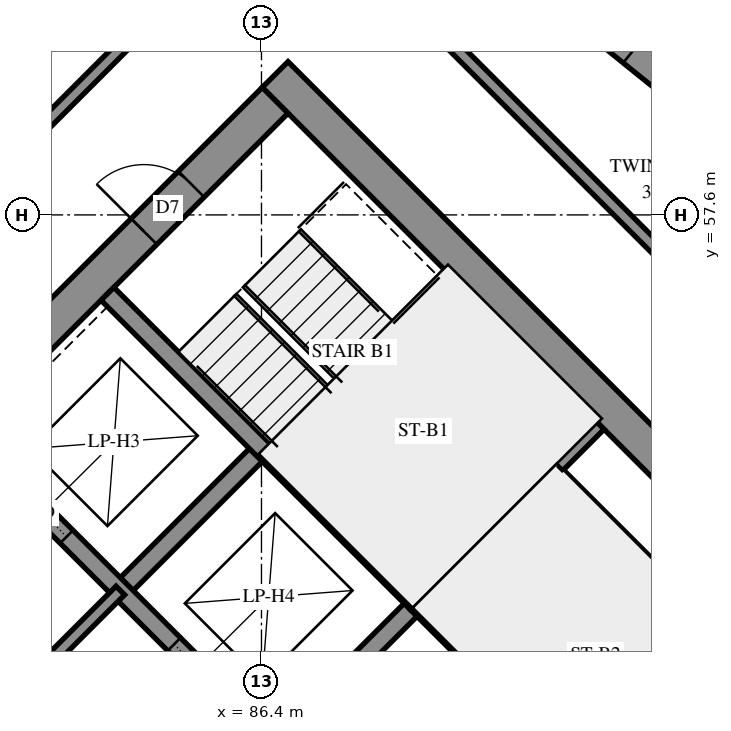
"""IFC4 building model, lengths in metres.
Left out: names, types, materials, properties, quantities, classifications, styles, units other than length and angle.
Written with IfcOpenShell. Run it as: python <this file> out.ifc"""

import sys

from ifc_helpers import new_model, si_unit, direction, frame, frame_2d, origin, place, context, subcontext, project, spatial, polyline, rectangle, outline, extrude, element, fill, save


model = new_model("IFC4")
c1 = context("Model", 3, precision=1e-05, world=origin(), true_north=direction((0.0, 1.0)))
c2 = subcontext(c1, "Body", "Model", "MODEL_VIEW")
j1 = project(units=[si_unit("LENGTHUNIT", "METRE"), si_unit("PLANEANGLEUNIT", "RADIAN")], contexts=[c1])
p1 = place(None, origin())
s1 = spatial("IfcSite", under=j1, at=p1, CompositionType="ELEMENT")
p2 = place(p1, origin())
s2 = spatial("IfcBuilding", under=s1, at=p2, CompositionType="ELEMENT")
p3 = place(p2, frame((0.0, 0.0, 142.2)))
s3 = spatial("IfcBuildingStorey", under=s2, at=p3, CompositionType="ELEMENT", Elevation=142.2)
p4 = place(p3, frame((86.625, 59.908, -0.3), z_axis=(0.0, 0.0, 1.0), x_axis=(0.7071067812, -0.7071067812, 0.0)))
e1 = element("IfcWall", 1, at=p4, inside=s3, PredefinedType="SHEAR", context=c2, shape_type="SweptSolid", body=[
    extrude(rectangle(XDim=15.6, YDim=0.6, at=frame_2d((7.8, 0.0))), origin(), (0.0, 0.0, 1.0), 2.7),
])
p5 = place(p4, frame((10.6, 0.0, 0.3)))
e2 = element("IfcOpeningElement", 2, at=p5, cuts=e1, PredefinedType="OPENING", context=c2, shape_type="SweptSolid", body=[
    extrude(rectangle(XDim=0.8, YDim=2.1, at=frame_2d((0.4, 1.05))), frame((0.0, 0.31, 0.0), z_axis=(0.0, -1.0, 0.0), x_axis=(1.0, 0.0, 0.0)), (0.0, 0.0, 1.0), 0.62),
])
p6 = place(p3, frame((76.442, 49.302, -0.3), z_axis=(0.0, 0.0, 1.0), x_axis=(0.7071067812, 0.7071067812, 0.0)))
e3 = element("IfcWall", 3, at=p6, inside=s3, PredefinedType="SHEAR", context=c2, shape_type="SweptSolid", body=[
    extrude(rectangle(XDim=14.4, YDim=0.6, at=frame_2d((7.2, 0.0))), origin(), (0.0, 0.0, 1.0), 2.7),
])
p7 = place(p6, frame((4.55, 0.0, 0.3)))
e4 = element("IfcOpeningElement", 4, at=p7, cuts=e3, PredefinedType="OPENING", context=c2, shape_type="SweptSolid", body=[
    extrude(rectangle(XDim=1.1, YDim=2.1, at=frame_2d((0.55, 1.05))), frame((0.0, 0.31, 0.0), z_axis=(0.0, -1.0, 0.0), x_axis=(1.0, 0.0, 0.0)), (0.0, 0.0, 1.0), 0.62),
])
p8 = place(p6, frame((11.35, 0.0, 0.3)))
e5 = element("IfcOpeningElement", 5, at=p8, cuts=e3, PredefinedType="OPENING", context=c2, shape_type="SweptSolid", body=[
    extrude(rectangle(XDim=1.1, YDim=2.1, at=frame_2d((0.55, 1.05))), frame((0.0, 0.31, 0.0), z_axis=(0.0, -1.0, 0.0), x_axis=(1.0, 0.0, 0.0)), (0.0, 0.0, 1.0), 0.62),
])
p9 = place(p3, frame((84.079, 51.423, 0.0), z_axis=(0.0, 0.0, 1.0), x_axis=(0.7071219326, 0.7070916295, 0.0)))
e6 = element("IfcWall", 6, at=p9, inside=s3, PredefinedType="SOLIDWALL", context=c2, shape_type="SweptSolid", body=[
    extrude(rectangle(XDim=3.3, YDim=0.3, at=frame_2d((1.65, 0.0))), origin(), (0.0, 0.0, 1.0), 3.1),
])
p10 = place(p3, frame((86.625, 48.878, 0.0), z_axis=(0.0, 0.0, 1.0), x_axis=(0.7071067812, 0.7071067812, 0.0)))
e7 = element("IfcWall", 7, at=p10, inside=s3, PredefinedType="SOLIDWALL", context=c2, shape_type="SweptSolid", body=[
    extrude(rectangle(XDim=3.3, YDim=0.3, at=frame_2d((1.65, 0.0))), origin(), (0.0, 0.0, 1.0), 3.1),
])
p11 = place(p3, frame((78.988, 51.423, 0.0), z_axis=(0.0, 0.0, 1.0), x_axis=(0.7071067812, -0.7071067812, 0.0)))
e8 = element("IfcWall", 8, at=p11, inside=s3, PredefinedType="SOLIDWALL", context=c2, shape_type="SweptSolid", body=[
    extrude(rectangle(XDim=14.4, YDim=0.3, at=frame_2d((7.2, 0.0))), origin(), (0.0, 0.0, 1.0), 3.1),
])
p12 = place(p11, frame((1.35, 0.0, 0.0)))
e9 = element("IfcOpeningElement", 9, at=p12, cuts=e8, PredefinedType="OPENING", context=c2, shape_type="SweptSolid", body=[
    extrude(rectangle(XDim=0.9, YDim=2.1, at=frame_2d((0.45, 1.05))), frame((0.0, 0.16, 0.0), z_axis=(0.0, -1.0, 0.0), x_axis=(1.0, 0.0, 0.0)), (0.0, 0.0, 1.0), 0.32),
])
p13 = place(p11, frame((4.95, 0.0, 0.0)))
e10 = element("IfcOpeningElement", 10, at=p13, cuts=e8, PredefinedType="OPENING", context=c2, shape_type="SweptSolid", body=[
    extrude(rectangle(XDim=0.9, YDim=2.1, at=frame_2d((0.45, 1.05))), frame((0.0, 0.16, 0.0), z_axis=(0.0, -1.0, 0.0), x_axis=(1.0, 0.0, 0.0)), (0.0, 0.0, 1.0), 0.32),
])
p14 = place(p11, frame((8.55, 0.0, 0.0)))
e11 = element("IfcOpeningElement", 11, at=p14, cuts=e8, PredefinedType="OPENING", context=c2, shape_type="SweptSolid", body=[
    extrude(rectangle(XDim=0.9, YDim=2.1, at=frame_2d((0.45, 1.05))), frame((0.0, 0.16, 0.0), z_axis=(0.0, -1.0, 0.0), x_axis=(1.0, 0.0, 0.0)), (0.0, 0.0, 1.0), 0.32),
])
p15 = place(p11, frame((12.05, 0.0, 0.0)))
e12 = element("IfcOpeningElement", 12, at=p15, cuts=e8, PredefinedType="OPENING", context=c2, shape_type="SweptSolid", body=[
    extrude(rectangle(XDim=1.1, YDim=2.1, at=frame_2d((0.55, 1.05))), frame((0.0, 0.16, 0.0), z_axis=(0.0, -1.0, 0.0), x_axis=(1.0, 0.0, 0.0)), (0.0, 0.0, 1.0), 0.32),
])
p16 = place(p3, frame((81.534, 53.969, 0.0), z_axis=(0.0, 0.0, 1.0), x_axis=(0.707103309, -0.7071102534, 0.0)))
e13 = element("IfcWall", 13, at=p16, inside=s3, PredefinedType="SOLIDWALL", context=c2, shape_type="SweptSolid", body=[
    extrude(rectangle(XDim=14.4, YDim=0.3, at=frame_2d((7.2, 0.0))), origin(), (0.0, 0.0, 1.0), 3.1),
])
p17 = place(p16, frame((1.25, 0.0, 0.0)))
e14 = element("IfcOpeningElement", 14, at=p17, cuts=e13, PredefinedType="OPENING", context=c2, shape_type="SweptSolid", body=[
    extrude(rectangle(XDim=1.1, YDim=2.1, at=frame_2d((0.55, 1.05))), frame((0.0, 0.16, 0.0), z_axis=(0.0, -1.0, 0.0), x_axis=(1.0, 0.0, 0.0)), (0.0, 0.0, 1.0), 0.32),
])
p18 = place(p16, frame((4.85, 0.0, 0.0)))
e15 = element("IfcOpeningElement", 15, at=p18, cuts=e13, PredefinedType="OPENING", context=c2, shape_type="SweptSolid", body=[
    extrude(rectangle(XDim=1.1, YDim=2.1, at=frame_2d((0.55, 1.05))), frame((0.0, 0.16, 0.0), z_axis=(0.0, -1.0, 0.0), x_axis=(1.0, 0.0, 0.0)), (0.0, 0.0, 1.0), 0.32),
])
p19 = place(p16, frame((8.45, 0.0, 0.0)))
e16 = element("IfcOpeningElement", 16, at=p19, cuts=e13, PredefinedType="OPENING", context=c2, shape_type="SweptSolid", body=[
    extrude(rectangle(XDim=1.1, YDim=2.1, at=frame_2d((0.55, 1.05))), frame((0.0, 0.16, 0.0), z_axis=(0.0, -1.0, 0.0), x_axis=(1.0, 0.0, 0.0)), (0.0, 0.0, 1.0), 0.32),
])
p20 = place(p16, frame((12.05, 0.0, 0.0)))
e17 = element("IfcOpeningElement", 17, at=p20, cuts=e13, PredefinedType="OPENING", context=c2, shape_type="SweptSolid", body=[
    extrude(rectangle(XDim=1.1, YDim=2.1, at=frame_2d((0.55, 1.05))), frame((0.0, 0.16, 0.0), z_axis=(0.0, -1.0, 0.0), x_axis=(1.0, 0.0, 0.0)), (0.0, 0.0, 1.0), 0.32),
])
for number, where, z_axis, x_axis in (
    (18, (83.867, 56.302, 0.0), (0.0, 0.0, 1.0), (0.707, -0.707, 0.0)),
    (19, (88.958, 51.211, 0.0), (0.0, 0.0, 1.0), (0.707, -0.707, 0.0)),
):
    element("IfcWall", number, at=place(p3, frame(where, z_axis=z_axis, x_axis=x_axis)), inside=s3, PredefinedType="SOLIDWALL", context=c2, shape_type="SweptSolid", body=[
        extrude(rectangle(XDim=7.2, YDim=0.3, at=frame_2d((3.6, 0.0))), origin(), (0.0, 0.0, 1.0), 3.1),
    ])
p21 = place(p3, frame((88.958, 51.211, 0.0), z_axis=(0.0, 0.0, 1.0), x_axis=(0.7071067812, 0.7071067812, 0.0)))
e20 = element("IfcWall", 20, at=p21, inside=s3, PredefinedType="SOLIDWALL", context=c2, shape_type="SweptSolid", body=[
    extrude(rectangle(XDim=4.2, YDim=0.3, at=frame_2d((2.1, 0.0))), origin(), (0.0, 0.0, 1.0), 3.1),
])
p22 = place(p3, frame((93.81, 59.242, 0.0), z_axis=(0.0, 0.0, 1.0), x_axis=(-0.7783182818, 0.6278699325, 0.0)))
e21 = element("IfcWall", 21, at=p22, inside=s3, PredefinedType="SOLIDWALL", context=c2, shape_type="SweptSolid", body=[
    extrude(outline(polyline([(-0.027, -0.25), (3.367, -0.25), (3.421, 0.25), (0.027, 0.25), (-0.027, -0.25)])), origin(), (0.0, 0.0, 1.0), 3.1),
])
p23 = place(p22, frame((1.677, 0.0, 0.45)))
e22 = element("IfcOpeningElement", 22, at=p23, cuts=e21, PredefinedType="OPENING", context=c2, shape_type="SweptSolid", body=[
    extrude(rectangle(XDim=1.2, YDim=2.5, at=frame_2d((0.6, 1.25))), frame((0.0, 0.26, 0.0), z_axis=(0.0, -1.0, 0.0), x_axis=(1.0, 0.0, 0.0)), (0.0, 0.0, 1.0), 0.52),
])
p24 = place(p3, frame((91.313, 53.354, 0.0), z_axis=(0.0, 0.0, 1.0), x_axis=(0.7071140275, -0.7070995348, 0.0)))
e23 = element("IfcWall", 23, at=p24, inside=s3, PredefinedType="PARTITIONING", context=c2, shape_type="SweptSolid", body=[
    extrude(rectangle(XDim=6.9, YDim=0.15, at=frame_2d((3.45, 0.0))), origin(), (0.0, 0.0, 1.0), 3.1),
])
p25 = place(p3, frame((81.534, 48.878, 0.0), z_axis=(0.0, 0.0, 1.0), x_axis=(0.707092892, 0.7071206701, 0.0)))
e24 = element("IfcWall", 24, at=p25, inside=s3, PredefinedType="PARTITIONING", context=c2, shape_type="SweptSolid", body=[
    extrude(rectangle(XDim=3.6, YDim=0.2, at=frame_2d((1.8, 0.0))), origin(), (0.0, 0.0, 1.0), 3.1),
])
p26 = place(p3, frame((88.326, 61.609, 0.0), z_axis=(0.0, 0.0, 1.0), x_axis=(0.7071067812, -0.7071067812, 0.0)))
e25 = element("IfcWall", 25, at=p26, inside=s3, PredefinedType="PARTITIONING", context=c2, shape_type="SweptSolid", body=[
    extrude(rectangle(XDim=10.14, YDim=0.2, at=frame_2d((5.07, 0.0))), origin(), (0.0, 0.0, 1.0), 3.1),
])
p27 = place(p26, frame((8.422, 0.0, 0.0)))
e26 = element("IfcOpeningElement", 26, at=p27, cuts=e25, PredefinedType="OPENING", context=c2, shape_type="SweptSolid", body=[
    extrude(rectangle(XDim=0.9, YDim=2.1, at=frame_2d((0.45, 1.05))), frame((0.0, 0.11, 0.0), z_axis=(0.0, -1.0, 0.0), x_axis=(1.0, 0.0, 0.0)), (0.0, 0.0, 1.0), 0.22),
])
p28 = place(p3, frame((80.902, 58.424, 0.0), z_axis=(0.0, 0.0, 1.0), x_axis=(0.7069988012, 0.7072147447, 0.0)))
e27 = element("IfcWall", 27, at=p28, inside=s3, PredefinedType="PARTITIONING", context=c2, shape_type="SweptSolid", body=[
    extrude(rectangle(XDim=9.262, YDim=0.2, at=frame_2d((4.631, 0.0))), origin(), (0.0, 0.0, 1.0), 3.1),
])
p29 = place(p3, frame((80.901, 57.157, 0.0), z_axis=(0.0, 0.0, 1.0), x_axis=(0.7071067812, 0.7071067812, 0.0)))
e28 = element("IfcWall", 28, at=p29, inside=s3, PredefinedType="PARTITIONING", context=c2, shape_type="SweptSolid", body=[
    extrude(rectangle(XDim=8.392, YDim=0.2, at=frame_2d((4.196, 0.0))), origin(), (0.0, 0.0, 1.0), 3.1),
])
p30 = place(p23, origin())
e29 = element("IfcWindow", 29, at=p30, inside=s3, PartitioningType="SINGLE_PANEL", PredefinedType="WINDOW", context=c2, shape_type="SweptSolid", body=[
    extrude(rectangle(XDim=1.2, YDim=2.5, at=frame_2d((0.6, 1.25))), frame((0.0, 0.18, 0.0), z_axis=(0.0, -1.0, 0.0), x_axis=(1.0, 0.0, 0.0)), (0.0, 0.0, 1.0), 0.06),
])
fill(e22, e29)
p31 = place(p8, origin())
e30 = element("IfcDoor", 30, at=p31, inside=s3, OperationType="SINGLE_SWING_LEFT", PredefinedType="DOOR", context=c2, shape_type="SweptSolid", body=[
    extrude(rectangle(XDim=1.1, YDim=2.1, at=frame_2d((0.55, 1.05))), frame((0.0, 0.025, 0.0), z_axis=(0.0, -1.0, 0.0), x_axis=(1.0, 0.0, 0.0)), (0.0, 0.0, 1.0), 0.05),
])
fill(e5, e30)
p32 = place(p17, origin())
e31 = element("IfcDoor", 31, at=p32, inside=s3, OperationType="SLIDING_TO_LEFT", PredefinedType="DOOR", context=c2, shape_type="SweptSolid", body=[
    extrude(rectangle(XDim=1.1, YDim=2.1, at=frame_2d((0.55, 1.05))), frame((0.0, 0.025, 0.0), z_axis=(0.0, -1.0, 0.0), x_axis=(1.0, 0.0, 0.0)), (0.0, 0.0, 1.0), 0.05),
])
fill(e14, e31)
p33 = place(p18, origin())
e32 = element("IfcDoor", 32, at=p33, inside=s3, OperationType="SLIDING_TO_RIGHT", PredefinedType="DOOR", context=c2, shape_type="SweptSolid", body=[
    extrude(rectangle(XDim=1.1, YDim=2.1, at=frame_2d((0.55, 1.05))), frame((0.0, 0.025, 0.0), z_axis=(0.0, -1.0, 0.0), x_axis=(1.0, 0.0, 0.0)), (0.0, 0.0, 1.0), 0.05),
])
fill(e15, e32)
save(model, sys.argv[1])
